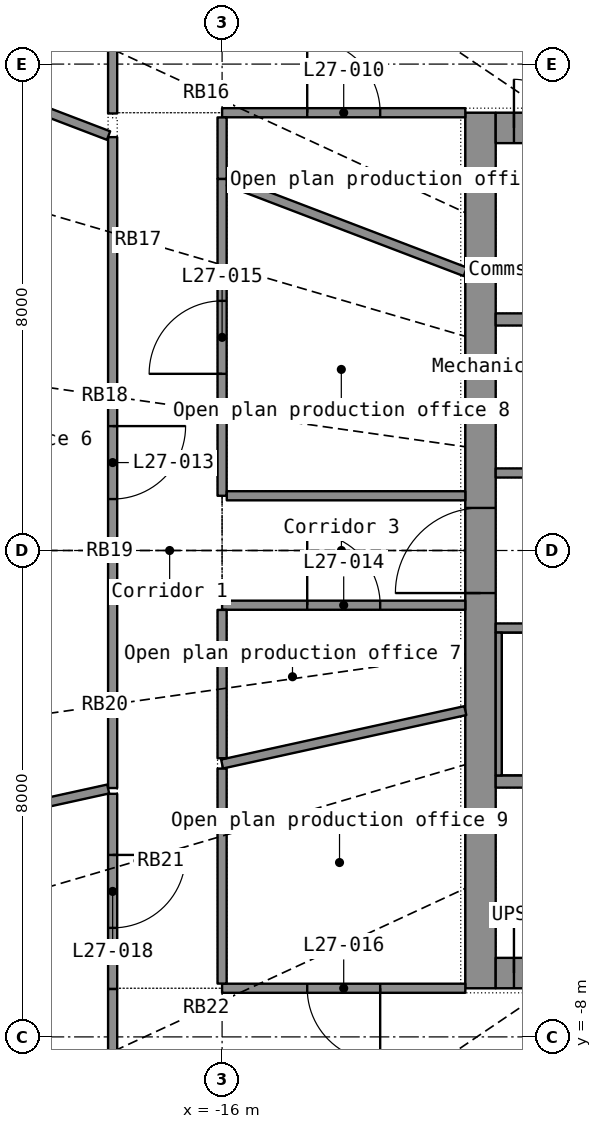
"""IFC4 building model, lengths in metres.
Left out: names, types, materials, properties, quantities, classifications, styles, units other than length and angle.
Written with IfcOpenShell. Run it as: python <this file> out.ifc"""

import sys

from ifc_helpers import new_model, si_unit, direction, frame, frame_2d, origin, place, context, subcontext, project, spatial, rectangle, extrude, element, fill, save


model = new_model("IFC4")
c1 = context("Model", 3, precision=1e-05, world=origin(), true_north=direction((0.0, 1.0)))
c2 = subcontext(c1, "Body", "Model", "MODEL_VIEW")
j1 = project(units=[si_unit("LENGTHUNIT", "METRE"), si_unit("PLANEANGLEUNIT", "RADIAN")], contexts=[c1])
p1 = place(None, origin())
s1 = spatial("IfcSite", under=j1, at=p1, CompositionType="ELEMENT")
p2 = place(p1, origin())
s2 = spatial("IfcBuilding", under=s1, at=p2, CompositionType="ELEMENT")
p3 = place(p2, frame((0.0, 0.0, 115.6)))
s3 = spatial("IfcBuildingStorey", under=s2, at=p3, CompositionType="ELEMENT", Elevation=115.6)
p4 = place(p3, frame((-11.75, -7.2, 0.0), z_axis=(0.0, 0.0, 1.0), x_axis=(0.0, 1.0, 0.0)))
e1 = element("IfcWall", 1, at=p4, inside=s3, PredefinedType="SHEAR", context=c2, shape_type="SweptSolid", body=[
    extrude(rectangle(XDim=14.4, YDim=0.5, at=frame_2d((7.2, 0.0))), origin(), (0.0, 0.0, 1.0), 3.3),
])
p5 = place(p4, frame((6.5, 0.0, 0.0)))
e2 = element("IfcOpeningElement", 2, at=p5, cuts=e1, PredefinedType="OPENING", context=c2, shape_type="SweptSolid", body=[
    extrude(rectangle(XDim=1.4, YDim=2.2, at=frame_2d((0.7, 1.1))), frame((0.0, 0.26, 0.0), z_axis=(0.0, -1.0, 0.0), x_axis=(1.0, 0.0, 0.0)), (0.0, 0.0, 1.0), 0.52),
])
p6 = place(p3, frame((-11.5, -6.95, 0.0), z_axis=(0.0, 0.0, 1.0), x_axis=(1.0, 0.0, 0.0)))
e3 = element("IfcWall", 3, at=p6, inside=s3, PredefinedType="SHEAR", context=c2, shape_type="SweptSolid", body=[
    extrude(rectangle(XDim=23.0, YDim=0.5, at=frame_2d((11.5, 0.0))), origin(), (0.0, 0.0, 1.0), 3.3),
])
p7 = place(p6, frame((1.95, 0.0, 0.0)))
e4 = element("IfcOpeningElement", 4, at=p7, cuts=e3, PredefinedType="OPENING", context=c2, shape_type="SweptSolid", body=[
    extrude(rectangle(XDim=1.1, YDim=2.2, at=frame_2d((0.55, 1.1))), frame((0.0, 0.26, 0.0), z_axis=(0.0, -1.0, 0.0), x_axis=(1.0, 0.0, 0.0)), (0.0, 0.0, 1.0), 0.52),
])
p8 = place(p6, frame((3.95, 0.0, 0.0)))
e5 = element("IfcOpeningElement", 5, at=p8, cuts=e3, PredefinedType="OPENING", context=c2, shape_type="SweptSolid", body=[
    extrude(rectangle(XDim=1.1, YDim=2.2, at=frame_2d((0.55, 1.1))), frame((0.0, 0.26, 0.0), z_axis=(0.0, -1.0, 0.0), x_axis=(1.0, 0.0, 0.0)), (0.0, 0.0, 1.0), 0.52),
])
p9 = place(p6, frame((5.95, 0.0, 0.0)))
e6 = element("IfcOpeningElement", 6, at=p9, cuts=e3, PredefinedType="OPENING", context=c2, shape_type="SweptSolid", body=[
    extrude(rectangle(XDim=1.1, YDim=2.2, at=frame_2d((0.55, 1.1))), frame((0.0, 0.26, 0.0), z_axis=(0.0, -1.0, 0.0), x_axis=(1.0, 0.0, 0.0)), (0.0, 0.0, 1.0), 0.52),
])
p10 = place(p6, frame((7.95, 0.0, 0.0)))
e7 = element("IfcOpeningElement", 7, at=p10, cuts=e3, PredefinedType="OPENING", context=c2, shape_type="SweptSolid", body=[
    extrude(rectangle(XDim=1.1, YDim=2.2, at=frame_2d((0.55, 1.1))), frame((0.0, 0.26, 0.0), z_axis=(0.0, -1.0, 0.0), x_axis=(1.0, 0.0, 0.0)), (0.0, 0.0, 1.0), 0.52),
])
p11 = place(p6, frame((9.95, 0.0, 0.0)))
e8 = element("IfcOpeningElement", 8, at=p11, cuts=e3, PredefinedType="OPENING", context=c2, shape_type="SweptSolid", body=[
    extrude(rectangle(XDim=1.1, YDim=2.2, at=frame_2d((0.55, 1.1))), frame((0.0, 0.26, 0.0), z_axis=(0.0, -1.0, 0.0), x_axis=(1.0, 0.0, 0.0)), (0.0, 0.0, 1.0), 0.52),
])
p12 = place(p6, frame((11.95, 0.0, 0.0)))
e9 = element("IfcOpeningElement", 9, at=p12, cuts=e3, PredefinedType="OPENING", context=c2, shape_type="SweptSolid", body=[
    extrude(rectangle(XDim=1.1, YDim=2.2, at=frame_2d((0.55, 1.1))), frame((0.0, 0.26, 0.0), z_axis=(0.0, -1.0, 0.0), x_axis=(1.0, 0.0, 0.0)), (0.0, 0.0, 1.0), 0.52),
])
p13 = place(p6, frame((13.95, 0.0, 0.0)))
e10 = element("IfcOpeningElement", 10, at=p13, cuts=e3, PredefinedType="OPENING", context=c2, shape_type="SweptSolid", body=[
    extrude(rectangle(XDim=1.1, YDim=2.2, at=frame_2d((0.55, 1.1))), frame((0.0, 0.26, 0.0), z_axis=(0.0, -1.0, 0.0), x_axis=(1.0, 0.0, 0.0)), (0.0, 0.0, 1.0), 0.52),
])
p14 = place(p6, frame((15.95, 0.0, 0.0)))
e11 = element("IfcOpeningElement", 11, at=p14, cuts=e3, PredefinedType="OPENING", context=c2, shape_type="SweptSolid", body=[
    extrude(rectangle(XDim=1.1, YDim=2.2, at=frame_2d((0.55, 1.1))), frame((0.0, 0.26, 0.0), z_axis=(0.0, -1.0, 0.0), x_axis=(1.0, 0.0, 0.0)), (0.0, 0.0, 1.0), 0.52),
])
p15 = place(p6, frame((19.95, 0.0, 0.0)))
e12 = element("IfcOpeningElement", 12, at=p15, cuts=e3, PredefinedType="OPENING", context=c2, shape_type="SweptSolid", body=[
    extrude(rectangle(XDim=1.1, YDim=2.2, at=frame_2d((0.55, 1.1))), frame((0.0, 0.26, 0.0), z_axis=(0.0, -1.0, 0.0), x_axis=(1.0, 0.0, 0.0)), (0.0, 0.0, 1.0), 0.52),
])
p16 = place(p6, frame((0.3, 0.0, 0.0)))
e13 = element("IfcOpeningElement", 13, at=p16, cuts=e3, PredefinedType="OPENING", context=c2, shape_type="SweptSolid", body=[
    extrude(rectangle(XDim=0.8, YDim=2.05, at=frame_2d((0.4, 1.025))), frame((0.0, 0.26, 0.0), z_axis=(0.0, -1.0, 0.0), x_axis=(1.0, 0.0, 0.0)), (0.0, 0.0, 1.0), 0.52),
])
p17 = place(p6, frame((21.9, 0.0, 0.0)))
e14 = element("IfcOpeningElement", 14, at=p17, cuts=e3, PredefinedType="OPENING", context=c2, shape_type="SweptSolid", body=[
    extrude(rectangle(XDim=0.8, YDim=2.05, at=frame_2d((0.4, 1.025))), frame((0.0, 0.26, 0.0), z_axis=(0.0, -1.0, 0.0), x_axis=(1.0, 0.0, 0.0)), (0.0, 0.0, 1.0), 0.52),
])
p18 = place(p3, frame((-11.5, 6.95, 0.0), z_axis=(0.0, 0.0, 1.0), x_axis=(1.0, 0.0, 0.0)))
e15 = element("IfcWall", 15, at=p18, inside=s3, PredefinedType="SHEAR", context=c2, shape_type="SweptSolid", body=[
    extrude(rectangle(XDim=23.0, YDim=0.5, at=frame_2d((11.5, 0.0))), origin(), (0.0, 0.0, 1.0), 3.3),
])
p19 = place(p18, frame((1.95, 0.0, 0.0)))
e16 = element("IfcOpeningElement", 16, at=p19, cuts=e15, PredefinedType="OPENING", context=c2, shape_type="SweptSolid", body=[
    extrude(rectangle(XDim=1.1, YDim=2.2, at=frame_2d((0.55, 1.1))), frame((0.0, 0.26, 0.0), z_axis=(0.0, -1.0, 0.0), x_axis=(1.0, 0.0, 0.0)), (0.0, 0.0, 1.0), 0.52),
])
p20 = place(p18, frame((8.05, 0.0, 0.0)))
e17 = element("IfcOpeningElement", 17, at=p20, cuts=e15, PredefinedType="OPENING", context=c2, shape_type="SweptSolid", body=[
    extrude(rectangle(XDim=0.9, YDim=2.1, at=frame_2d((0.45, 1.05))), frame((0.0, 0.26, 0.0), z_axis=(0.0, -1.0, 0.0), x_axis=(1.0, 0.0, 0.0)), (0.0, 0.0, 1.0), 0.52),
])
p21 = place(p18, frame((13.05, 0.0, 0.0)))
e18 = element("IfcOpeningElement", 18, at=p21, cuts=e15, PredefinedType="OPENING", context=c2, shape_type="SweptSolid", body=[
    extrude(rectangle(XDim=0.9, YDim=2.1, at=frame_2d((0.45, 1.05))), frame((0.0, 0.26, 0.0), z_axis=(0.0, -1.0, 0.0), x_axis=(1.0, 0.0, 0.0)), (0.0, 0.0, 1.0), 0.52),
])
p22 = place(p18, frame((18.05, 0.0, 0.0)))
e19 = element("IfcOpeningElement", 19, at=p22, cuts=e15, PredefinedType="OPENING", context=c2, shape_type="SweptSolid", body=[
    extrude(rectangle(XDim=0.9, YDim=2.1, at=frame_2d((0.45, 1.05))), frame((0.0, 0.26, 0.0), z_axis=(0.0, -1.0, 0.0), x_axis=(1.0, 0.0, 0.0)), (0.0, 0.0, 1.0), 0.52),
])
p23 = place(p18, frame((0.3, 0.0, 0.0)))
e20 = element("IfcOpeningElement", 20, at=p23, cuts=e15, PredefinedType="OPENING", context=c2, shape_type="SweptSolid", body=[
    extrude(rectangle(XDim=0.8, YDim=2.05, at=frame_2d((0.4, 1.025))), frame((0.0, 0.26, 0.0), z_axis=(0.0, -1.0, 0.0), x_axis=(1.0, 0.0, 0.0)), (0.0, 0.0, 1.0), 0.52),
])
p24 = place(p18, frame((21.9, 0.0, 0.0)))
e21 = element("IfcOpeningElement", 21, at=p24, cuts=e15, PredefinedType="OPENING", context=c2, shape_type="SweptSolid", body=[
    extrude(rectangle(XDim=0.8, YDim=2.05, at=frame_2d((0.4, 1.025))), frame((0.0, 0.26, 0.0), z_axis=(0.0, -1.0, 0.0), x_axis=(1.0, 0.0, 0.0)), (0.0, 0.0, 1.0), 0.52),
])
for number, where, z_axis, x_axis in (
    (22, (-11.5, -3.8, 0.0), (0.0, 0.0, 1.0), (1.0, 0.0, 0.0)),
    (23, (-11.5, 3.8, 0.0), (0.0, 0.0, 1.0), (1.0, 0.0, 0.0)),
):
    element("IfcWall", number, at=place(p3, frame(where, z_axis=z_axis, x_axis=x_axis)), inside=s3, PredefinedType="SHEAR", context=c2, shape_type="SweptSolid", body=[
        extrude(rectangle(XDim=23.0, YDim=0.2, at=frame_2d((11.5, 0.0))), origin(), (0.0, 0.0, 1.0), 3.3),
    ])
p25 = place(p3, frame((-11.5, -1.275, 0.0), z_axis=(0.0, 0.0, 1.0), x_axis=(1.0, 0.0, 0.0)))
e24 = element("IfcWall", 24, at=p25, inside=s3, PredefinedType="SHEAR", context=c2, shape_type="SweptSolid", body=[
    extrude(rectangle(XDim=8.5, YDim=0.15, at=frame_2d((4.25, 0.0))), origin(), (0.0, 0.0, 1.0), 3.3),
])
p26 = place(p25, frame((5.35, 0.0, 0.0)))
e25 = element("IfcOpeningElement", 25, at=p26, cuts=e24, PredefinedType="OPENING", context=c2, shape_type="SweptSolid", body=[
    extrude(rectangle(XDim=1.1, YDim=2.15, at=frame_2d((0.55, 1.075))), frame((0.0, 0.085, 0.0), z_axis=(0.0, -1.0, 0.0), x_axis=(1.0, 0.0, 0.0)), (0.0, 0.0, 1.0), 0.17),
])
p27 = place(p25, frame((7.15, 0.0, 0.0)))
e26 = element("IfcOpeningElement", 26, at=p27, cuts=e24, PredefinedType="OPENING", context=c2, shape_type="SweptSolid", body=[
    extrude(rectangle(XDim=0.9, YDim=2.1, at=frame_2d((0.45, 1.05))), frame((0.0, 0.085, 0.0), z_axis=(0.0, -1.0, 0.0), x_axis=(1.0, 0.0, 0.0)), (0.0, 0.0, 1.0), 0.17),
])
p28 = place(p3, frame((-11.5, 1.275, 0.0), z_axis=(0.0, 0.0, 1.0), x_axis=(1.0, 0.0, 0.0)))
e27 = element("IfcWall", 27, at=p28, inside=s3, PredefinedType="PARTITIONING", context=c2, shape_type="SweptSolid", body=[
    extrude(rectangle(XDim=8.5, YDim=0.15, at=frame_2d((4.25, 0.0))), origin(), (0.0, 0.0, 1.0), 3.3),
])
p29 = place(p28, frame((0.616, 0.0, 0.0)))
e28 = element("IfcOpeningElement", 28, at=p29, cuts=e27, PredefinedType="OPENING", context=c2, shape_type="SweptSolid", body=[
    extrude(rectangle(XDim=0.9, YDim=2.1, at=frame_2d((0.45, 1.05))), frame((0.0, 0.085, 0.0), z_axis=(0.0, -1.0, 0.0), x_axis=(1.0, 0.0, 0.0)), (0.0, 0.0, 1.0), 0.17),
])
p30 = place(p28, frame((3.374, 0.0, 0.0)))
e29 = element("IfcOpeningElement", 29, at=p30, cuts=e27, PredefinedType="OPENING", context=c2, shape_type="SweptSolid", body=[
    extrude(rectangle(XDim=0.85, YDim=2.1, at=frame_2d((0.425, 1.05))), frame((0.0, 0.085, 0.0), z_axis=(0.0, -1.0, 0.0), x_axis=(1.0, 0.0, 0.0)), (0.0, 0.0, 1.0), 0.17),
])
p31 = place(p28, frame((6.558, 0.0, 0.0)))
e30 = element("IfcOpeningElement", 30, at=p31, cuts=e27, PredefinedType="OPENING", context=c2, shape_type="SweptSolid", body=[
    extrude(rectangle(XDim=0.85, YDim=2.1, at=frame_2d((0.425, 1.05))), frame((0.0, 0.085, 0.0), z_axis=(0.0, -1.0, 0.0), x_axis=(1.0, 0.0, 0.0)), (0.0, 0.0, 1.0), 0.17),
])
p32 = place(p3, frame((-11.45, -3.7, 0.0), z_axis=(0.0, 0.0, 1.0), x_axis=(0.0, 1.0, 0.0)))
e31 = element("IfcWall", 31, at=p32, inside=s3, PredefinedType="SHEAR", context=c2, shape_type="SweptSolid", body=[
    extrude(rectangle(XDim=2.35, YDim=0.1, at=frame_2d((1.175, 0.0))), origin(), (0.0, 0.0, 1.0), 3.3),
])
p33 = place(p3, frame((-17.8, 6.799, 0.0), z_axis=(0.0, 0.0, 1.0), x_axis=(0.0, -1.0, 0.0)))
e32 = element("IfcWall", 32, at=p33, inside=s3, PredefinedType="PARTITIONING", context=c2, shape_type="SweptSolid", body=[
    extrude(rectangle(XDim=10.706, YDim=0.15, at=frame_2d((5.353, 0.0))), origin(), (0.0, 0.0, 1.0), 2.4),
])
p34 = place(p33, frame((4.753, 0.0, 0.0)))
e33 = element("IfcOpeningElement", 33, at=p34, cuts=e32, PredefinedType="OPENING", context=c2, shape_type="SweptSolid", body=[
    extrude(rectangle(XDim=1.2, YDim=2.2, at=frame_2d((0.6, 1.1))), frame((0.0, 0.085, 0.0), z_axis=(0.0, -1.0, 0.0), x_axis=(1.0, 0.0, 0.0)), (0.0, 0.0, 1.0), 0.17),
])
p35 = place(p3, frame((-24.615, -5.402, 0.0), z_axis=(0.0, 0.0, 1.0), x_axis=(0.97675139, 0.214375192, 0.0)))
e34 = element("IfcWall", 34, at=p35, inside=s3, PredefinedType="PARTITIONING", context=c2, shape_type="SweptSolid", body=[
    extrude(rectangle(XDim=6.901, YDim=0.15, at=frame_2d((3.451, 0.0))), origin(), (0.0, 0.0, 1.0), 2.4),
])
p36 = place(p3, frame((-23.094, 8.821, 0.0), z_axis=(0.0, 0.0, 1.0), x_axis=(0.934174226, -0.356817201, 0.0)))
e35 = element("IfcWall", 35, at=p36, inside=s3, PredefinedType="PARTITIONING", context=c2, shape_type="SweptSolid", body=[
    extrude(rectangle(XDim=5.595, YDim=0.15, at=frame_2d((2.797, 0.0))), origin(), (0.0, 0.0, 1.0), 2.4),
])
p37 = place(p3, frame((-16.0, 0.9, 0.0), z_axis=(0.0, 0.0, 1.0), x_axis=(0.0, 1.0, 0.0)))
e36 = element("IfcWall", 36, at=p37, inside=s3, PredefinedType="PARTITIONING", context=c2, shape_type="SweptSolid", body=[
    extrude(rectangle(XDim=5.211, YDim=0.15, at=frame_2d((2.606, 0.0))), origin(), (0.0, 0.0, 1.0), 2.4),
])
p38 = place(p37, frame((2.006, 0.0, 0.0)))
e37 = element("IfcOpeningElement", 37, at=p38, cuts=e36, PredefinedType="OPENING", context=c2, shape_type="SweptSolid", body=[
    extrude(rectangle(XDim=1.2, YDim=2.2, at=frame_2d((0.6, 1.1))), frame((0.0, 0.085, 0.0), z_axis=(0.0, -1.0, 0.0), x_axis=(1.0, 0.0, 0.0)), (0.0, 0.0, 1.0), 0.17),
])
p39 = place(p3, frame((-15.896, 6.072, 0.0), z_axis=(0.0, 0.0, 1.0), x_axis=(0.934175823, -0.356813021, 0.0)))
e38 = element("IfcWall", 38, at=p39, inside=s3, PredefinedType="PARTITIONING", context=c2, shape_type="SweptSolid", body=[
    extrude(rectangle(XDim=4.171, YDim=0.15, at=frame_2d((2.085, 0.0))), origin(), (0.0, 0.0, 1.0), 2.4),
])
p40 = place(p3, frame((-16.0, -3.512, 0.0), z_axis=(0.0, 0.0, 1.0), x_axis=(0.976750433, 0.214379551, 0.0)))
e39 = element("IfcWall", 39, at=p40, inside=s3, PredefinedType="PARTITIONING", context=c2, shape_type="SweptSolid", body=[
    extrude(rectangle(XDim=4.095, YDim=0.15, at=frame_2d((2.048, 0.0))), origin(), (0.0, 0.0, 1.0), 2.4),
])
p41 = place(p3, frame((-16.0, -0.9, 0.0), z_axis=(0.0, 0.0, 1.0), x_axis=(1.0, 0.0, 0.0)))
e40 = element("IfcWall", 40, at=p41, inside=s3, PredefinedType="PARTITIONING", context=c2, shape_type="SweptSolid", body=[
    extrude(rectangle(XDim=4.0, YDim=0.15, at=frame_2d((2.0, 0.0))), origin(), (0.0, 0.0, 1.0), 2.4),
])
p42 = place(p41, frame((1.4, 0.0, 0.0)))
e41 = element("IfcOpeningElement", 41, at=p42, cuts=e40, PredefinedType="OPENING", context=c2, shape_type="SweptSolid", body=[
    extrude(rectangle(XDim=1.2, YDim=2.2, at=frame_2d((0.6, 1.1))), frame((0.0, 0.085, 0.0), z_axis=(0.0, -1.0, 0.0), x_axis=(1.0, 0.0, 0.0)), (0.0, 0.0, 1.0), 0.17),
])
p43 = place(p3, frame((-16.0, 7.2, 0.0), z_axis=(0.0, 0.0, 1.0), x_axis=(1.0, 0.0, 0.0)))
e42 = element("IfcWall", 42, at=p43, inside=s3, PredefinedType="PARTITIONING", context=c2, shape_type="SweptSolid", body=[
    extrude(rectangle(XDim=4.0, YDim=0.15, at=frame_2d((2.0, 0.0))), origin(), (0.0, 0.0, 1.0), 2.4),
])
p44 = place(p43, frame((1.4, 0.0, 0.0)))
e43 = element("IfcOpeningElement", 43, at=p44, cuts=e42, PredefinedType="OPENING", context=c2, shape_type="SweptSolid", body=[
    extrude(rectangle(XDim=1.2, YDim=2.2, at=frame_2d((0.6, 1.1))), frame((0.0, 0.085, 0.0), z_axis=(0.0, -1.0, 0.0), x_axis=(1.0, 0.0, 0.0)), (0.0, 0.0, 1.0), 0.17),
])
p45 = place(p3, frame((-12.0, -7.2, 0.0), z_axis=(0.0, 0.0, 1.0), x_axis=(-1.0, 0.0, 0.0)))
e44 = element("IfcWall", 44, at=p45, inside=s3, PredefinedType="PARTITIONING", context=c2, shape_type="SweptSolid", body=[
    extrude(rectangle(XDim=4.0, YDim=0.15, at=frame_2d((2.0, 0.0))), origin(), (0.0, 0.0, 1.0), 2.4),
])
p46 = place(p45, frame((1.4, 0.0, 0.0)))
e45 = element("IfcOpeningElement", 45, at=p46, cuts=e44, PredefinedType="OPENING", context=c2, shape_type="SweptSolid", body=[
    extrude(rectangle(XDim=1.2, YDim=2.2, at=frame_2d((0.6, 1.1))), frame((0.0, 0.085, 0.0), z_axis=(0.0, -1.0, 0.0), x_axis=(1.0, 0.0, 0.0)), (0.0, 0.0, 1.0), 0.17),
])
p47 = place(p3, frame((-12.0, 0.9, 0.0), z_axis=(0.0, 0.0, 1.0), x_axis=(-1.0, 0.0, 0.0)))
e46 = element("IfcWall", 46, at=p47, inside=s3, PredefinedType="PARTITIONING", context=c2, shape_type="SweptSolid", body=[
    extrude(rectangle(XDim=3.923, YDim=0.15, at=frame_2d((1.961, 0.0))), origin(), (0.0, 0.0, 1.0), 2.4),
])
p48 = place(p3, frame((-16.0, -7.123, 0.0), z_axis=(0.0, 0.0, 1.0), x_axis=(0.0, 1.0, 0.0)))
e47 = element("IfcWall", 47, at=p48, inside=s3, PredefinedType="PARTITIONING", context=c2, shape_type="SweptSolid", body=[
    extrude(rectangle(XDim=3.536, YDim=0.15, at=frame_2d((1.768, 0.0))), origin(), (0.0, 0.0, 1.0), 2.4),
])
p49 = place(p3, frame((-17.8, 10.723, 0.0), z_axis=(0.0, 0.0, 1.0), x_axis=(0.0, -1.0, 0.0)))
e48 = element("IfcWall", 48, at=p49, inside=s3, PredefinedType="PARTITIONING", context=c2, shape_type="SweptSolid", body=[
    extrude(rectangle(XDim=3.535, YDim=0.15, at=frame_2d((1.768, 0.0))), origin(), (0.0, 0.0, 1.0), 2.4),
])
p50 = place(p49, frame((1.167, 0.0, 0.0)))
e49 = element("IfcOpeningElement", 49, at=p50, cuts=e48, PredefinedType="OPENING", context=c2, shape_type="SweptSolid", body=[
    extrude(rectangle(XDim=1.2, YDim=2.2, at=frame_2d((0.6, 1.1))), frame((0.0, 0.085, 0.0), z_axis=(0.0, -1.0, 0.0), x_axis=(1.0, 0.0, 0.0)), (0.0, 0.0, 1.0), 0.17),
])
p51 = place(p3, frame((-17.8, -4.002, 0.0), z_axis=(0.0, 0.0, 1.0), x_axis=(0.0, -1.0, 0.0)))
e50 = element("IfcWall", 50, at=p51, inside=s3, PredefinedType="PARTITIONING", context=c2, shape_type="SweptSolid", body=[
    extrude(rectangle(XDim=3.21, YDim=0.15, at=frame_2d((1.605, 0.0))), origin(), (0.0, 0.0, 1.0), 2.4),
])
p52 = place(p51, frame((1.005, 0.0, 0.0)))
e51 = element("IfcOpeningElement", 51, at=p52, cuts=e50, PredefinedType="OPENING", context=c2, shape_type="SweptSolid", body=[
    extrude(rectangle(XDim=1.2, YDim=2.2, at=frame_2d((0.6, 1.1))), frame((0.0, 0.085, 0.0), z_axis=(0.0, -1.0, 0.0), x_axis=(1.0, 0.0, 0.0)), (0.0, 0.0, 1.0), 0.17),
])
p53 = place(p3, frame((-16.0, -3.417, 0.0), z_axis=(0.0, 0.0, 1.0), x_axis=(0.0, 1.0, 0.0)))
e52 = element("IfcWall", 52, at=p53, inside=s3, PredefinedType="PARTITIONING", context=c2, shape_type="SweptSolid", body=[
    extrude(rectangle(XDim=2.439, YDim=0.15, at=frame_2d((1.22, 0.0))), origin(), (0.0, 0.0, 1.0), 2.4),
])
p54 = place(p3, frame((-17.8, -7.213, 0.0), z_axis=(0.0, 0.0, 1.0), x_axis=(0.0, -1.0, 0.0)))
e53 = element("IfcWall", 53, at=p54, inside=s3, PredefinedType="PARTITIONING", context=c2, shape_type="SweptSolid", body=[
    extrude(rectangle(XDim=2.31, YDim=0.15, at=frame_2d((1.155, 0.0))), origin(), (0.0, 0.0, 1.0), 2.4),
])
p55 = place(p3, frame((-16.0, 6.112, 0.0), z_axis=(0.0, 0.0, 1.0), x_axis=(0.0, 1.0, 0.0)))
e54 = element("IfcWall", 54, at=p55, inside=s3, PredefinedType="PARTITIONING", context=c2, shape_type="SweptSolid", body=[
    extrude(rectangle(XDim=1.011, YDim=0.15, at=frame_2d((0.505, 0.0))), origin(), (0.0, 0.0, 1.0), 2.4),
])
p56 = place(p16, origin())
e55 = element("IfcDoor", 55, at=p56, inside=s3, OperationType="SINGLE_SWING_LEFT", PredefinedType="DOOR", context=c2, shape_type="SweptSolid", body=[
    extrude(rectangle(XDim=0.8, YDim=2.05, at=frame_2d((0.4, 1.025))), frame((0.0, 0.025, 0.0), z_axis=(0.0, -1.0, 0.0), x_axis=(1.0, 0.0, 0.0)), (0.0, 0.0, 1.0), 0.05),
])
fill(e13, e55)
p57 = place(p23, origin())
e56 = element("IfcDoor", 56, at=p57, inside=s3, OperationType="SINGLE_SWING_LEFT", PredefinedType="DOOR", context=c2, shape_type="SweptSolid", body=[
    extrude(rectangle(XDim=0.8, YDim=2.05, at=frame_2d((0.4, 1.025))), frame((0.0, 0.025, 0.0), z_axis=(0.0, -1.0, 0.0), x_axis=(1.0, 0.0, 0.0)), (0.0, 0.0, 1.0), 0.05),
])
fill(e20, e56)
p58 = place(p5, origin())
e57 = element("IfcDoor", 57, at=p58, inside=s3, OperationType="DOUBLE_DOOR_SINGLE_SWING", PredefinedType="DOOR", context=c2, shape_type="SweptSolid", body=[
    extrude(rectangle(XDim=1.4, YDim=2.2, at=frame_2d((0.7, 1.1))), frame((0.0, 0.025, 0.0), z_axis=(0.0, -1.0, 0.0), x_axis=(1.0, 0.0, 0.0)), (0.0, 0.0, 1.0), 0.05),
])
fill(e2, e57)
p59 = place(p44, origin())
e58 = element("IfcDoor", 58, at=p59, inside=s3, OperationType="DOUBLE_DOOR_SINGLE_SWING", PredefinedType="DOOR", context=c2, shape_type="SweptSolid", body=[
    extrude(rectangle(XDim=1.2, YDim=2.2, at=frame_2d((0.6, 1.1))), frame((0.0, 0.025, 0.0), z_axis=(0.0, -1.0, 0.0), x_axis=(1.0, 0.0, 0.0)), (0.0, 0.0, 1.0), 0.05),
])
fill(e43, e58)
p60 = place(p34, origin())
e59 = element("IfcDoor", 59, at=p60, inside=s3, OperationType="DOUBLE_DOOR_SINGLE_SWING", PredefinedType="DOOR", context=c2, shape_type="SweptSolid", body=[
    extrude(rectangle(XDim=1.2, YDim=2.2, at=frame_2d((0.6, 1.1))), frame((0.0, 0.025, 0.0), z_axis=(0.0, -1.0, 0.0), x_axis=(1.0, 0.0, 0.0)), (0.0, 0.0, 1.0), 0.05),
])
fill(e33, e59)
p61 = place(p42, origin())
e60 = element("IfcDoor", 60, at=p61, inside=s3, OperationType="DOUBLE_DOOR_SINGLE_SWING", PredefinedType="DOOR", context=c2, shape_type="SweptSolid", body=[
    extrude(rectangle(XDim=1.2, YDim=2.2, at=frame_2d((0.6, 1.1))), frame((0.0, 0.025, 0.0), z_axis=(0.0, -1.0, 0.0), x_axis=(1.0, 0.0, 0.0)), (0.0, 0.0, 1.0), 0.05),
])
fill(e41, e60)
p62 = place(p38, origin())
e61 = element("IfcDoor", 61, at=p62, inside=s3, OperationType="DOUBLE_DOOR_SINGLE_SWING", PredefinedType="DOOR", context=c2, shape_type="SweptSolid", body=[
    extrude(rectangle(XDim=1.2, YDim=2.2, at=frame_2d((0.6, 1.1))), frame((0.0, 0.025, 0.0), z_axis=(0.0, -1.0, 0.0), x_axis=(1.0, 0.0, 0.0)), (0.0, 0.0, 1.0), 0.05),
])
fill(e37, e61)
p63 = place(p46, origin())
e62 = element("IfcDoor", 62, at=p63, inside=s3, OperationType="DOUBLE_DOOR_SINGLE_SWING", PredefinedType="DOOR", context=c2, shape_type="SweptSolid", body=[
    extrude(rectangle(XDim=1.2, YDim=2.2, at=frame_2d((0.6, 1.1))), frame((0.0, 0.025, 0.0), z_axis=(0.0, -1.0, 0.0), x_axis=(1.0, 0.0, 0.0)), (0.0, 0.0, 1.0), 0.05),
])
fill(e45, e62)
p64 = place(p52, origin())
e63 = element("IfcDoor", 63, at=p64, inside=s3, OperationType="DOUBLE_DOOR_SINGLE_SWING", PredefinedType="DOOR", context=c2, shape_type="SweptSolid", body=[
    extrude(rectangle(XDim=1.2, YDim=2.2, at=frame_2d((0.6, 1.1))), frame((0.0, 0.025, 0.0), z_axis=(0.0, -1.0, 0.0), x_axis=(1.0, 0.0, 0.0)), (0.0, 0.0, 1.0), 0.05),
])
fill(e51, e63)
save(model, sys.argv[1])
